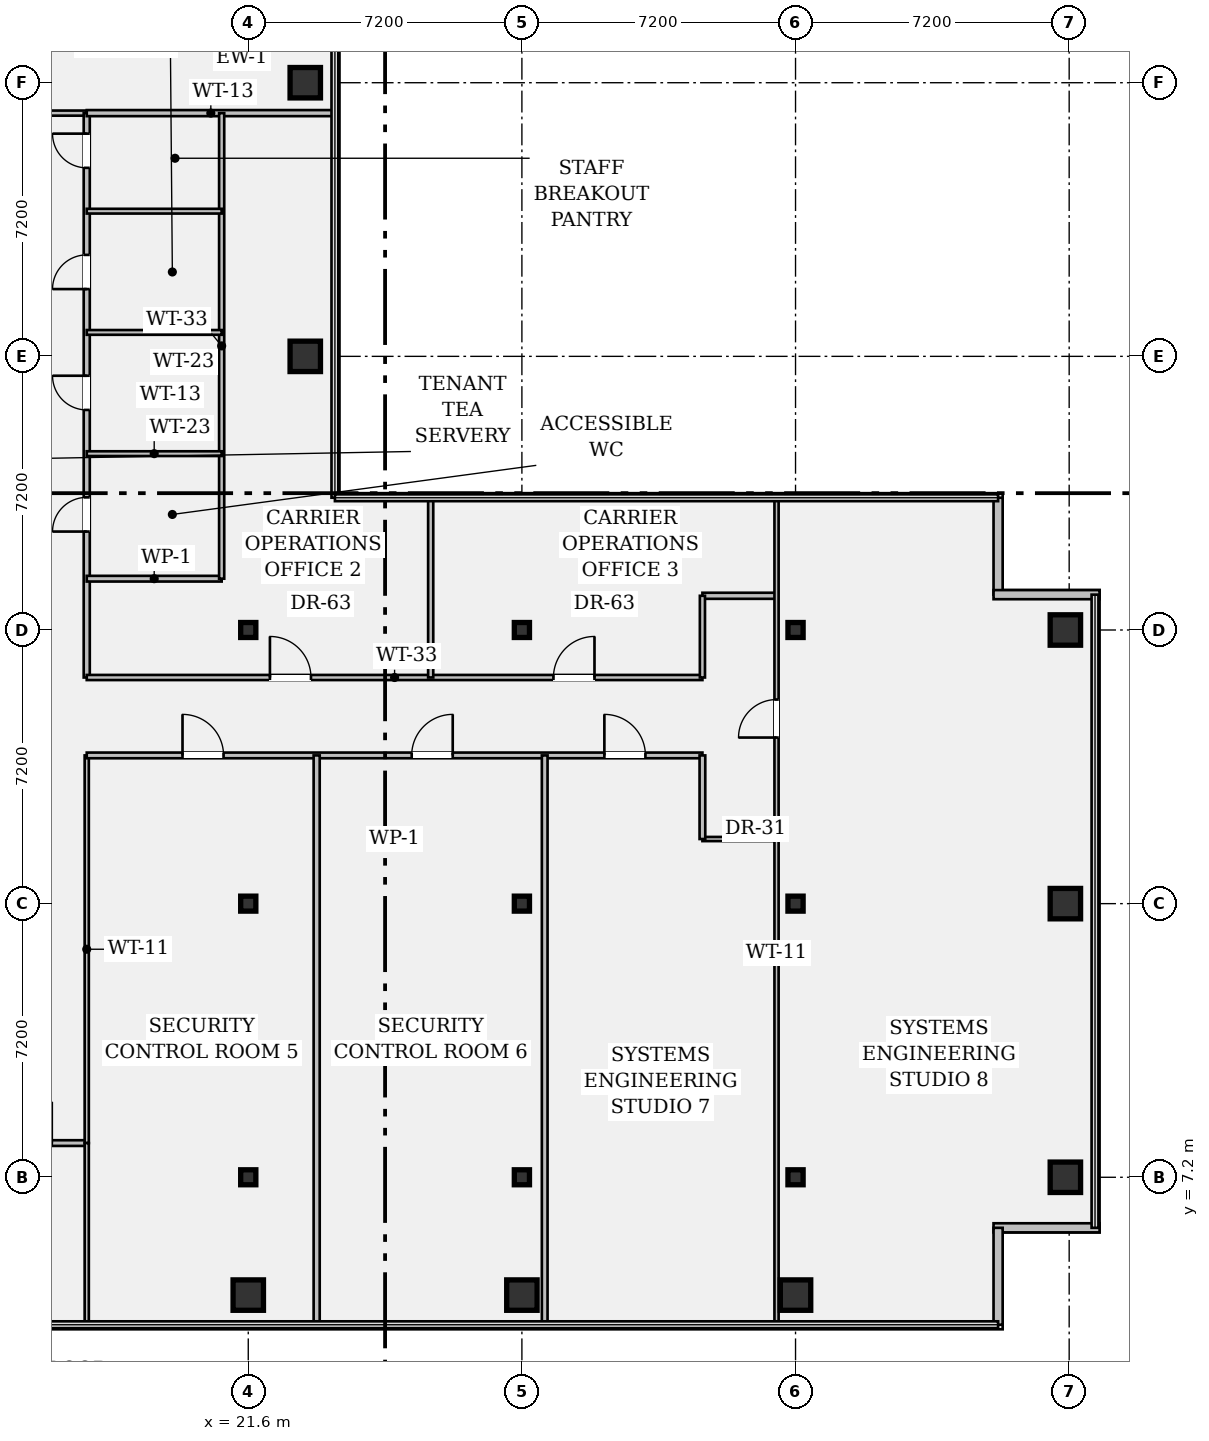
"""IFC4 building model, lengths in metres.
Left out: names, types, materials, properties, quantities, classifications, styles, units other than length and angle.
Written with IfcOpenShell. Run it as: python <this file> out.ifc"""

import sys

from ifc_helpers import new_model, si_unit, direction, frame, frame_2d, origin, origin_2d, place, context, subcontext, project, spatial, rectangle, hollow_rectangle, i_section, extrude, element, fill, save


model = new_model("IFC4")
c1 = context("Model", 3, precision=1e-05, world=origin(), true_north=direction((0.0, 1.0)))
c2 = subcontext(c1, "Body", "Model", "MODEL_VIEW")
j1 = project(units=[si_unit("LENGTHUNIT", "METRE"), si_unit("PLANEANGLEUNIT", "RADIAN")], contexts=[c1])
p1 = place(None, origin())
s1 = spatial("IfcSite", under=j1, at=p1, CompositionType="ELEMENT")
p2 = place(p1, origin())
s2 = spatial("IfcBuilding", under=s1, at=p2, CompositionType="ELEMENT")
p3 = place(p2, frame((0.0, 0.0, 194.25)))
s3 = spatial("IfcBuildingStorey", under=s2, at=p3, CompositionType="ELEMENT", Elevation=194.25)
p4 = place(p3, frame((21.6, 4.1, 0.0), z_axis=(0.0, 0.0, 1.0), x_axis=(1.0, 0.0, 0.0)))
e1 = element("IfcColumn", 1, at=p4, inside=s3, PredefinedType="COLUMN", context=c2, shape_type="SweptSolid", body=[
    extrude(hollow_rectangle(XDim=0.8, YDim=0.8, WallThickness=0.05, at=origin_2d()), origin(), (0.0, 0.0, 1.0), 3.24),
])
for number, where, z_axis, x_axis in (
    (2, (21.6, 7.2, 0.0), (0.0, 0.0, 1.0), (1.0, 0.0, 0.0)),
    (3, (21.6, 14.4, 0.0), (0.0, 0.0, 1.0), (1.0, 0.0, 0.0)),
    (4, (21.6, 21.6, 0.0), (0.0, 0.0, 1.0), (1.0, 0.0, 0.0)),
):
    element("IfcColumn", number, at=place(p3, frame(where, z_axis=z_axis, x_axis=x_axis)), inside=s3, PredefinedType="COLUMN", context=c2, shape_type="SweptSolid", body=[
        extrude(i_section(OverallWidth=0.399, OverallDepth=0.394, WebThickness=0.023, FlangeThickness=0.037, FilletRadius=0.018, at=origin_2d()), origin(), (0.0, 0.0, 1.0), 3.24),
    ])
for number, where, z_axis, x_axis in (
    (5, (23.1, 28.8, 0.0), (0.0, 0.0, 1.0), (1.0, 0.0, 0.0)),
    (6, (23.1, 36.0, 0.0), (0.0, 0.0, 1.0), (1.0, 0.0, 0.0)),
    (7, (28.8, 4.1, 0.0), (0.0, 0.0, 1.0), (1.0, 0.0, 0.0)),
):
    element("IfcColumn", number, at=place(p3, frame(where, z_axis=z_axis, x_axis=x_axis)), inside=s3, PredefinedType="COLUMN", context=c2, shape_type="SweptSolid", body=[
        extrude(hollow_rectangle(XDim=0.8, YDim=0.8, WallThickness=0.05, at=origin_2d()), origin(), (0.0, 0.0, 1.0), 3.24),
    ])
for number, where, z_axis, x_axis in (
    (8, (28.8, 7.2, 0.0), (0.0, 0.0, 1.0), (1.0, 0.0, 0.0)),
    (9, (28.8, 14.4, 0.0), (0.0, 0.0, 1.0), (1.0, 0.0, 0.0)),
    (10, (28.8, 21.6, 0.0), (0.0, 0.0, 1.0), (1.0, 0.0, 0.0)),
):
    element("IfcColumn", number, at=place(p3, frame(where, z_axis=z_axis, x_axis=x_axis)), inside=s3, PredefinedType="COLUMN", context=c2, shape_type="SweptSolid", body=[
        extrude(i_section(OverallWidth=0.399, OverallDepth=0.394, WebThickness=0.023, FlangeThickness=0.037, FilletRadius=0.018, at=origin_2d()), origin(), (0.0, 0.0, 1.0), 3.24),
    ])
p5 = place(p3, frame((36.0, 4.1, 0.0), z_axis=(0.0, 0.0, 1.0), x_axis=(1.0, 0.0, 0.0)))
e11 = element("IfcColumn", 11, at=p5, inside=s3, PredefinedType="COLUMN", context=c2, shape_type="SweptSolid", body=[
    extrude(hollow_rectangle(XDim=0.8, YDim=0.8, WallThickness=0.05, at=origin_2d()), origin(), (0.0, 0.0, 1.0), 3.24),
])
for number, where, z_axis, x_axis in (
    (12, (36.0, 7.2, 0.0), (0.0, 0.0, 1.0), (1.0, 0.0, 0.0)),
    (13, (36.0, 14.4, 0.0), (0.0, 0.0, 1.0), (1.0, 0.0, 0.0)),
    (14, (36.0, 21.6, 0.0), (0.0, 0.0, 1.0), (1.0, 0.0, 0.0)),
):
    element("IfcColumn", number, at=place(p3, frame(where, z_axis=z_axis, x_axis=x_axis)), inside=s3, PredefinedType="COLUMN", context=c2, shape_type="SweptSolid", body=[
        extrude(i_section(OverallWidth=0.399, OverallDepth=0.394, WebThickness=0.023, FlangeThickness=0.037, FilletRadius=0.018, at=origin_2d()), origin(), (0.0, 0.0, 1.0), 3.24),
    ])
for number, where, z_axis, x_axis in (
    (15, (43.1, 7.2, 0.0), (0.0, 0.0, 1.0), (1.0, 0.0, 0.0)),
    (16, (43.1, 14.4, 0.0), (0.0, 0.0, 1.0), (1.0, 0.0, 0.0)),
    (17, (43.1, 21.6, 0.0), (0.0, 0.0, 1.0), (1.0, 0.0, 0.0)),
):
    element("IfcColumn", number, at=place(p3, frame(where, z_axis=z_axis, x_axis=x_axis)), inside=s3, PredefinedType="COLUMN", context=c2, shape_type="SweptSolid", body=[
        extrude(hollow_rectangle(XDim=0.8, YDim=0.8, WallThickness=0.05, at=origin_2d()), origin(), (0.0, 0.0, 1.0), 3.24),
    ])
p6 = place(p3, frame((41.33, 25.08, 0.0), z_axis=(0.0, 0.0, 1.0), x_axis=(0.0, -1.0, 0.0)))
e18 = element("IfcWall", 18, at=p6, inside=s3, PredefinedType="STANDARD", context=c2, shape_type="SweptSolid", body=[
    extrude(rectangle(XDim=2.55, YDim=0.24, at=frame_2d((1.275, 0.0))), origin(), (0.0, 0.0, 1.0), 3.24),
])
for number, where, z_axis, x_axis in (
    (19, (41.21, 22.53, 0.0), (0.0, 0.0, 1.0), (1.0, 0.0, 0.0)),
    (20, (44.0, 5.87, 0.0), (0.0, 0.0, 1.0), (-1.0, 0.0, 0.0)),
):
    element("IfcWall", number, at=place(p3, frame(where, z_axis=z_axis, x_axis=x_axis)), inside=s3, PredefinedType="STANDARD", context=c2, shape_type="SweptSolid", body=[
        extrude(rectangle(XDim=2.79, YDim=0.24, at=frame_2d((1.395, 0.0))), origin(), (0.0, 0.0, 1.0), 3.24),
    ])
p7 = place(p3, frame((41.33, 5.87, 0.0), z_axis=(0.0, 0.0, 1.0), x_axis=(0.0, -1.0, 0.0)))
e21 = element("IfcWall", 21, at=p7, inside=s3, PredefinedType="STANDARD", context=c2, shape_type="SweptSolid", body=[
    extrude(rectangle(XDim=2.55, YDim=0.24, at=frame_2d((1.275, 0.0))), origin(), (0.0, 0.0, 1.0), 3.24),
])
p8 = place(p3, frame((14.4, 8.1, 0.0), z_axis=(0.0, 0.0, 1.0), x_axis=(1.0, 0.0, 0.0)))
e22 = element("IfcWall", 22, at=p8, inside=s3, PredefinedType="PARTITIONING", context=c2, shape_type="SweptSolid", body=[
    extrude(rectangle(XDim=2.95, YDim=0.15, at=frame_2d((1.475, 0.0))), origin(), (0.0, 0.0, 1.0), 2.808),
])
p9 = place(p8, frame((0.95, 0.0, 0.0)))
e23 = element("IfcOpeningElement", 23, at=p9, cuts=e22, PredefinedType="OPENING", context=c2, shape_type="SweptSolid", body=[
    extrude(rectangle(XDim=1.08, YDim=2.15, at=frame_2d((0.54, 1.075))), frame((0.0, 0.087, 0.0), z_axis=(0.0, -1.0, 0.0), x_axis=(1.0, 0.0, 0.0)), (0.0, 0.0, 1.0), 0.174),
])
p10 = place(p3, frame((14.4, 35.2, 0.0), z_axis=(0.0, 0.0, 1.0), x_axis=(1.0, 0.0, 0.0)))
e24 = element("IfcWall", 24, at=p10, inside=s3, PredefinedType="PARTITIONING", context=c2, shape_type="SweptSolid", body=[
    extrude(rectangle(XDim=2.95, YDim=0.135, at=frame_2d((1.475, 0.0))), origin(), (0.0, 0.0, 1.0), 2.808),
])
p11 = place(p10, frame((0.95, 0.0, 0.0)))
e25 = element("IfcOpeningElement", 25, at=p11, cuts=e24, PredefinedType="OPENING", context=c2, shape_type="SweptSolid", body=[
    extrude(rectangle(XDim=1.0, YDim=2.15, at=frame_2d((0.5, 1.075))), frame((0.0, 0.08, 0.0), z_axis=(0.0, -1.0, 0.0), x_axis=(1.0, 0.0, 0.0)), (0.0, 0.0, 1.0), 0.159),
])
p12 = place(p3, frame((17.35, 8.1, 0.0), z_axis=(0.0, 0.0, 1.0), x_axis=(0.0, 1.0, 0.0)))
e26 = element("IfcWall", 26, at=p12, inside=s3, PredefinedType="PARTITIONING", context=c2, shape_type="SweptSolid", body=[
    extrude(rectangle(XDim=10.2, YDim=0.11, at=frame_2d((5.1, 0.0))), origin(), (0.0, 0.0, 1.0), 2.603),
])
p13 = place(p3, frame((17.35, 20.35, 0.0), z_axis=(0.0, 0.0, 1.0), x_axis=(0.0, 1.0, 0.0)))
e27 = element("IfcWall", 27, at=p13, inside=s3, PredefinedType="PARTITIONING", context=c2, shape_type="SweptSolid", body=[
    extrude(rectangle(XDim=14.85, YDim=0.16, at=frame_2d((7.425, 0.0))), origin(), (0.0, 0.0, 1.0), 2.603),
])
p14 = place(p13, frame((3.84, 0.0, 0.0)))
e28 = element("IfcOpeningElement", 28, at=p14, cuts=e27, PredefinedType="OPENING", context=c2, shape_type="SweptSolid", body=[
    extrude(rectangle(XDim=0.9, YDim=2.15, at=frame_2d((0.45, 1.075))), frame((0.0, 0.092, 0.0), z_axis=(0.0, -1.0, 0.0), x_axis=(1.0, 0.0, 0.0)), (0.0, 0.0, 1.0), 0.184),
])
p15 = place(p13, frame((7.04, 0.0, 0.0)))
e29 = element("IfcOpeningElement", 29, at=p15, cuts=e27, PredefinedType="OPENING", context=c2, shape_type="SweptSolid", body=[
    extrude(rectangle(XDim=0.9, YDim=2.15, at=frame_2d((0.45, 1.075))), frame((0.0, 0.092, 0.0), z_axis=(0.0, -1.0, 0.0), x_axis=(1.0, 0.0, 0.0)), (0.0, 0.0, 1.0), 0.184),
])
p16 = place(p13, frame((10.22, 0.0, 0.0)))
e30 = element("IfcOpeningElement", 30, at=p16, cuts=e27, PredefinedType="OPENING", context=c2, shape_type="SweptSolid", body=[
    extrude(rectangle(XDim=0.9, YDim=2.15, at=frame_2d((0.45, 1.075))), frame((0.0, 0.092, 0.0), z_axis=(0.0, -1.0, 0.0), x_axis=(1.0, 0.0, 0.0)), (0.0, 0.0, 1.0), 0.184),
])
p17 = place(p13, frame((13.41, 0.0, 0.0)))
e31 = element("IfcOpeningElement", 31, at=p17, cuts=e27, PredefinedType="OPENING", context=c2, shape_type="SweptSolid", body=[
    extrude(rectangle(XDim=0.9, YDim=2.15, at=frame_2d((0.45, 1.075))), frame((0.0, 0.092, 0.0), z_axis=(0.0, -1.0, 0.0), x_axis=(1.0, 0.0, 0.0)), (0.0, 0.0, 1.0), 0.184),
])
p18 = place(p3, frame((17.35, 18.3, 0.0), z_axis=(0.0, 0.0, 1.0), x_axis=(1.0, 0.0, 0.0)))
e32 = element("IfcWall", 32, at=p18, inside=s3, PredefinedType="PARTITIONING", context=c2, shape_type="SweptSolid", body=[
    extrude(rectangle(XDim=16.2, YDim=0.15, at=frame_2d((8.1, 0.0))), origin(), (0.0, 0.0, 1.0), 2.603),
])
p19 = place(p18, frame((2.52, 0.0, 0.0)))
e33 = element("IfcOpeningElement", 33, at=p19, cuts=e32, PredefinedType="OPENING", context=c2, shape_type="SweptSolid", body=[
    extrude(rectangle(XDim=1.08, YDim=2.15, at=frame_2d((0.54, 1.075))), frame((0.0, 0.087, 0.0), z_axis=(0.0, -1.0, 0.0), x_axis=(1.0, 0.0, 0.0)), (0.0, 0.0, 1.0), 0.174),
])
p20 = place(p18, frame((8.55, 0.0, 0.0)))
e34 = element("IfcOpeningElement", 34, at=p20, cuts=e32, PredefinedType="OPENING", context=c2, shape_type="SweptSolid", body=[
    extrude(rectangle(XDim=1.08, YDim=2.15, at=frame_2d((0.54, 1.075))), frame((0.0, 0.087, 0.0), z_axis=(0.0, -1.0, 0.0), x_axis=(1.0, 0.0, 0.0)), (0.0, 0.0, 1.0), 0.174),
])
p21 = place(p18, frame((13.62, 0.0, 0.0)))
e35 = element("IfcOpeningElement", 35, at=p21, cuts=e32, PredefinedType="OPENING", context=c2, shape_type="SweptSolid", body=[
    extrude(rectangle(XDim=1.08, YDim=2.15, at=frame_2d((0.54, 1.075))), frame((0.0, 0.087, 0.0), z_axis=(0.0, -1.0, 0.0), x_axis=(1.0, 0.0, 0.0)), (0.0, 0.0, 1.0), 0.174),
])
p22 = place(p3, frame((17.35, 20.35, 0.0), z_axis=(0.0, 0.0, 1.0), x_axis=(1.0, 0.0, 0.0)))
e36 = element("IfcWall", 36, at=p22, inside=s3, PredefinedType="PARTITIONING", context=c2, shape_type="SweptSolid", body=[
    extrude(rectangle(XDim=16.2, YDim=0.135, at=frame_2d((8.1, 0.0))), origin(), (0.0, 0.0, 1.0), 2.603),
])
p23 = place(p22, frame((4.82, 0.0, 0.0)))
e37 = element("IfcOpeningElement", 37, at=p23, cuts=e36, PredefinedType="OPENING", context=c2, shape_type="SweptSolid", body=[
    extrude(rectangle(XDim=1.08, YDim=2.15, at=frame_2d((0.54, 1.075))), frame((0.0, 0.08, 0.0), z_axis=(0.0, -1.0, 0.0), x_axis=(1.0, 0.0, 0.0)), (0.0, 0.0, 1.0), 0.159),
])
p24 = place(p22, frame((12.28, 0.0, 0.0)))
e38 = element("IfcOpeningElement", 38, at=p24, cuts=e36, PredefinedType="OPENING", context=c2, shape_type="SweptSolid", body=[
    extrude(rectangle(XDim=1.08, YDim=2.15, at=frame_2d((0.54, 1.075))), frame((0.0, 0.08, 0.0), z_axis=(0.0, -1.0, 0.0), x_axis=(1.0, 0.0, 0.0)), (0.0, 0.0, 1.0), 0.159),
])
p25 = place(p3, frame((33.55, 16.1, 0.0), z_axis=(0.0, 0.0, 1.0), x_axis=(1.0, 0.0, 0.0)))
e39 = element("IfcWall", 39, at=p25, inside=s3, PredefinedType="PARTITIONING", context=c2, shape_type="SweptSolid", body=[
    extrude(rectangle(XDim=1.95, YDim=0.11, at=frame_2d((0.975, 0.0))), origin(), (0.0, 0.0, 1.0), 2.808),
])
p26 = place(p3, frame((33.55, 22.5, 0.0), z_axis=(0.0, 0.0, 1.0), x_axis=(1.0, 0.0, 0.0)))
e40 = element("IfcWall", 40, at=p26, inside=s3, PredefinedType="PARTITIONING", context=c2, shape_type="SweptSolid", body=[
    extrude(rectangle(XDim=1.95, YDim=0.16, at=frame_2d((0.975, 0.0))), origin(), (0.0, 0.0, 1.0), 3.24),
])
p27 = place(p3, frame((33.55, 16.1, 0.0), z_axis=(0.0, 0.0, 1.0), x_axis=(0.0, 1.0, 0.0)))
e41 = element("IfcWall", 41, at=p27, inside=s3, PredefinedType="PARTITIONING", context=c2, shape_type="SweptSolid", body=[
    extrude(rectangle(XDim=2.2, YDim=0.15, at=frame_2d((1.1, 0.0))), origin(), (0.0, 0.0, 1.0), 3.24),
])
p28 = place(p3, frame((33.55, 20.35, 0.0), z_axis=(0.0, 0.0, 1.0), x_axis=(0.0, 1.0, 0.0)))
e42 = element("IfcWall", 42, at=p28, inside=s3, PredefinedType="PARTITIONING", context=c2, shape_type="SweptSolid", body=[
    extrude(rectangle(XDim=2.15, YDim=0.135, at=frame_2d((1.075, 0.0))), origin(), (0.0, 0.0, 1.0), 2.603),
])
p29 = place(p3, frame((35.5, 3.32, 0.0), z_axis=(0.0, 0.0, 1.0), x_axis=(0.0, 1.0, 0.0)))
e43 = element("IfcWall", 43, at=p29, inside=s3, PredefinedType="PARTITIONING", context=c2, shape_type="SweptSolid", body=[
    extrude(rectangle(XDim=21.76, YDim=0.11, at=frame_2d((10.88, 0.0))), origin(), (0.0, 0.0, 1.0), 2.603),
])
p30 = place(p29, frame((15.45, 0.0, 0.0)))
e44 = element("IfcOpeningElement", 44, at=p30, cuts=e43, PredefinedType="OPENING", context=c2, shape_type="SweptSolid", body=[
    extrude(rectangle(XDim=1.0, YDim=2.15, at=frame_2d((0.5, 1.075))), frame((0.0, 0.067, 0.0), z_axis=(0.0, -1.0, 0.0), x_axis=(1.0, 0.0, 0.0)), (0.0, 0.0, 1.0), 0.134),
])
p31 = place(p3, frame((17.35, 35.2, 0.0), z_axis=(0.0, 0.0, 1.0), x_axis=(1.0, 0.0, 0.0)))
e45 = element("IfcWall", 45, at=p31, inside=s3, PredefinedType="PARTITIONING", context=c2, shape_type="SweptSolid", body=[
    extrude(rectangle(XDim=6.53, YDim=0.16, at=frame_2d((3.265, 0.0))), origin(), (0.0, 0.0, 1.0), 2.758),
])
p32 = place(p3, frame((17.35, 22.95, 0.0), z_axis=(0.0, 0.0, 1.0), x_axis=(1.0, 0.0, 0.0)))
e46 = element("IfcWall", 46, at=p32, inside=s3, PredefinedType="PARTITIONING", context=c2, shape_type="SweptSolid", body=[
    extrude(rectangle(XDim=3.55, YDim=0.15, at=frame_2d((1.775, 0.0))), origin(), (0.0, 0.0, 1.0), 2.808),
])
p33 = place(p3, frame((20.9, 22.95, 0.0), z_axis=(0.0, 0.0, 1.0), x_axis=(0.0, 1.0, 0.0)))
e47 = element("IfcWall", 47, at=p33, inside=s3, PredefinedType="PARTITIONING", context=c2, shape_type="SweptSolid", body=[
    extrude(rectangle(XDim=12.25, YDim=0.135, at=frame_2d((6.125, 0.0))), origin(), (0.0, 0.0, 1.0), 2.603),
])
for number, where, z_axis, x_axis in (
    (48, (17.35, 26.24, 0.0), (0.0, 0.0, 1.0), (1.0, 0.0, 0.0)),
    (49, (17.35, 29.43, 0.0), (0.0, 0.0, 1.0), (1.0, 0.0, 0.0)),
    (50, (17.35, 32.62, 0.0), (0.0, 0.0, 1.0), (1.0, 0.0, 0.0)),
):
    element("IfcWall", number, at=place(p3, frame(where, z_axis=z_axis, x_axis=x_axis)), inside=s3, PredefinedType="PARTITIONING", context=c2, shape_type="SweptSolid", body=[
        extrude(rectangle(XDim=3.55, YDim=0.125, at=frame_2d((1.775, 0.0))), origin(), (0.0, 0.0, 1.0), 2.808),
    ])
p34 = place(p3, frame((26.4, 20.35, 0.0), z_axis=(0.0, 0.0, 1.0), x_axis=(0.0, 1.0, 0.0)))
e51 = element("IfcWall", 51, at=p34, inside=s3, PredefinedType="PARTITIONING", context=c2, shape_type="SweptSolid", body=[
    extrude(rectangle(XDim=4.7, YDim=0.135, at=frame_2d((2.35, 0.0))), origin(), (0.0, 0.0, 1.0), 2.603),
])
p35 = place(p3, frame((17.35, 3.32, 0.0), z_axis=(0.0, 0.0, 1.0), x_axis=(0.0, 1.0, 0.0)))
e52 = element("IfcWall", 52, at=p35, inside=s3, PredefinedType="PARTITIONING", context=c2, shape_type="SweptSolid", body=[
    extrude(rectangle(XDim=4.78, YDim=0.11, at=frame_2d((2.39, 0.0))), origin(), (0.0, 0.0, 1.0), 2.603),
])
p36 = place(p3, frame((23.4, 3.32, 0.0), z_axis=(0.0, 0.0, 1.0), x_axis=(0.0, 1.0, 0.0)))
e53 = element("IfcWall", 53, at=p36, inside=s3, PredefinedType="PARTITIONING", context=c2, shape_type="SweptSolid", body=[
    extrude(rectangle(XDim=14.98, YDim=0.16, at=frame_2d((7.49, 0.0))), origin(), (0.0, 0.0, 1.0), 2.603),
])
p37 = place(p3, frame((29.4, 3.32, 0.0), z_axis=(0.0, 0.0, 1.0), x_axis=(0.0, 1.0, 0.0)))
e54 = element("IfcWall", 54, at=p37, inside=s3, PredefinedType="PARTITIONING", context=c2, shape_type="SweptSolid", body=[
    extrude(rectangle(XDim=14.98, YDim=0.15, at=frame_2d((7.49, 0.0))), origin(), (0.0, 0.0, 1.0), 2.603),
])
p38 = place(p14, origin())
e55 = element("IfcDoor", 55, at=p38, inside=s3, OperationType="SINGLE_SWING_LEFT", PredefinedType="DOOR", context=c2, shape_type="SweptSolid", body=[
    extrude(rectangle(XDim=0.9, YDim=2.15, at=frame_2d((0.45, 1.075))), frame((0.0, 0.025, 0.0), z_axis=(0.0, -1.0, 0.0), x_axis=(1.0, 0.0, 0.0)), (0.0, 0.0, 1.0), 0.05),
])
fill(e28, e55)
p39 = place(p15, origin())
e56 = element("IfcDoor", 56, at=p39, inside=s3, OperationType="SINGLE_SWING_RIGHT", PredefinedType="DOOR", context=c2, shape_type="SweptSolid", body=[
    extrude(rectangle(XDim=0.9, YDim=2.15, at=frame_2d((0.45, 1.075))), frame((0.0, 0.025, 0.0), z_axis=(0.0, -1.0, 0.0), x_axis=(1.0, 0.0, 0.0)), (0.0, 0.0, 1.0), 0.05),
])
fill(e29, e56)
p40 = place(p16, origin())
e57 = element("IfcDoor", 57, at=p40, inside=s3, OperationType="SINGLE_SWING_LEFT", PredefinedType="DOOR", context=c2, shape_type="SweptSolid", body=[
    extrude(rectangle(XDim=0.9, YDim=2.15, at=frame_2d((0.45, 1.075))), frame((0.0, 0.025, 0.0), z_axis=(0.0, -1.0, 0.0), x_axis=(1.0, 0.0, 0.0)), (0.0, 0.0, 1.0), 0.05),
])
fill(e30, e57)
p41 = place(p17, origin())
e58 = element("IfcDoor", 58, at=p41, inside=s3, OperationType="SINGLE_SWING_RIGHT", PredefinedType="DOOR", context=c2, shape_type="SweptSolid", body=[
    extrude(rectangle(XDim=0.9, YDim=2.15, at=frame_2d((0.45, 1.075))), frame((0.0, 0.025, 0.0), z_axis=(0.0, -1.0, 0.0), x_axis=(1.0, 0.0, 0.0)), (0.0, 0.0, 1.0), 0.05),
])
fill(e31, e58)
p42 = place(p23, origin())
e59 = element("IfcDoor", 59, at=p42, inside=s3, OperationType="SINGLE_SWING_LEFT", PredefinedType="DOOR", context=c2, shape_type="SweptSolid", body=[
    extrude(rectangle(XDim=1.08, YDim=2.15, at=frame_2d((0.54, 1.075))), frame((0.0, 0.025, 0.0), z_axis=(0.0, -1.0, 0.0), x_axis=(1.0, 0.0, 0.0)), (0.0, 0.0, 1.0), 0.05),
])
fill(e37, e59)
p43 = place(p24, origin())
e60 = element("IfcDoor", 60, at=p43, inside=s3, OperationType="SINGLE_SWING_RIGHT", PredefinedType="DOOR", context=c2, shape_type="SweptSolid", body=[
    extrude(rectangle(XDim=1.08, YDim=2.15, at=frame_2d((0.54, 1.075))), frame((0.0, 0.025, 0.0), z_axis=(0.0, -1.0, 0.0), x_axis=(1.0, 0.0, 0.0)), (0.0, 0.0, 1.0), 0.05),
])
fill(e38, e60)
p44 = place(p19, origin())
e61 = element("IfcDoor", 61, at=p44, inside=s3, OperationType="SINGLE_SWING_LEFT", PredefinedType="DOOR", context=c2, shape_type="SweptSolid", body=[
    extrude(rectangle(XDim=1.08, YDim=2.15, at=frame_2d((0.54, 1.075))), frame((0.0, 0.025, 0.0), z_axis=(0.0, -1.0, 0.0), x_axis=(1.0, 0.0, 0.0)), (0.0, 0.0, 1.0), 0.05),
])
fill(e33, e61)
p45 = place(p20, origin())
e62 = element("IfcDoor", 62, at=p45, inside=s3, OperationType="SINGLE_SWING_RIGHT", PredefinedType="DOOR", context=c2, shape_type="SweptSolid", body=[
    extrude(rectangle(XDim=1.08, YDim=2.15, at=frame_2d((0.54, 1.075))), frame((0.0, 0.025, 0.0), z_axis=(0.0, -1.0, 0.0), x_axis=(1.0, 0.0, 0.0)), (0.0, 0.0, 1.0), 0.05),
])
fill(e34, e62)
p46 = place(p21, origin())
e63 = element("IfcDoor", 63, at=p46, inside=s3, OperationType="SINGLE_SWING_LEFT", PredefinedType="DOOR", context=c2, shape_type="SweptSolid", body=[
    extrude(rectangle(XDim=1.08, YDim=2.15, at=frame_2d((0.54, 1.075))), frame((0.0, 0.025, 0.0), z_axis=(0.0, -1.0, 0.0), x_axis=(1.0, 0.0, 0.0)), (0.0, 0.0, 1.0), 0.05),
])
fill(e35, e63)
p47 = place(p30, origin())
e64 = element("IfcDoor", 64, at=p47, inside=s3, OperationType="SINGLE_SWING_LEFT", PredefinedType="DOOR", context=c2, shape_type="SweptSolid", body=[
    extrude(rectangle(XDim=1.0, YDim=2.15, at=frame_2d((0.5, 1.075))), frame((0.0, 0.025, 0.0), z_axis=(0.0, -1.0, 0.0), x_axis=(1.0, 0.0, 0.0)), (0.0, 0.0, 1.0), 0.05),
])
fill(e44, e64)
save(model, sys.argv[1])
